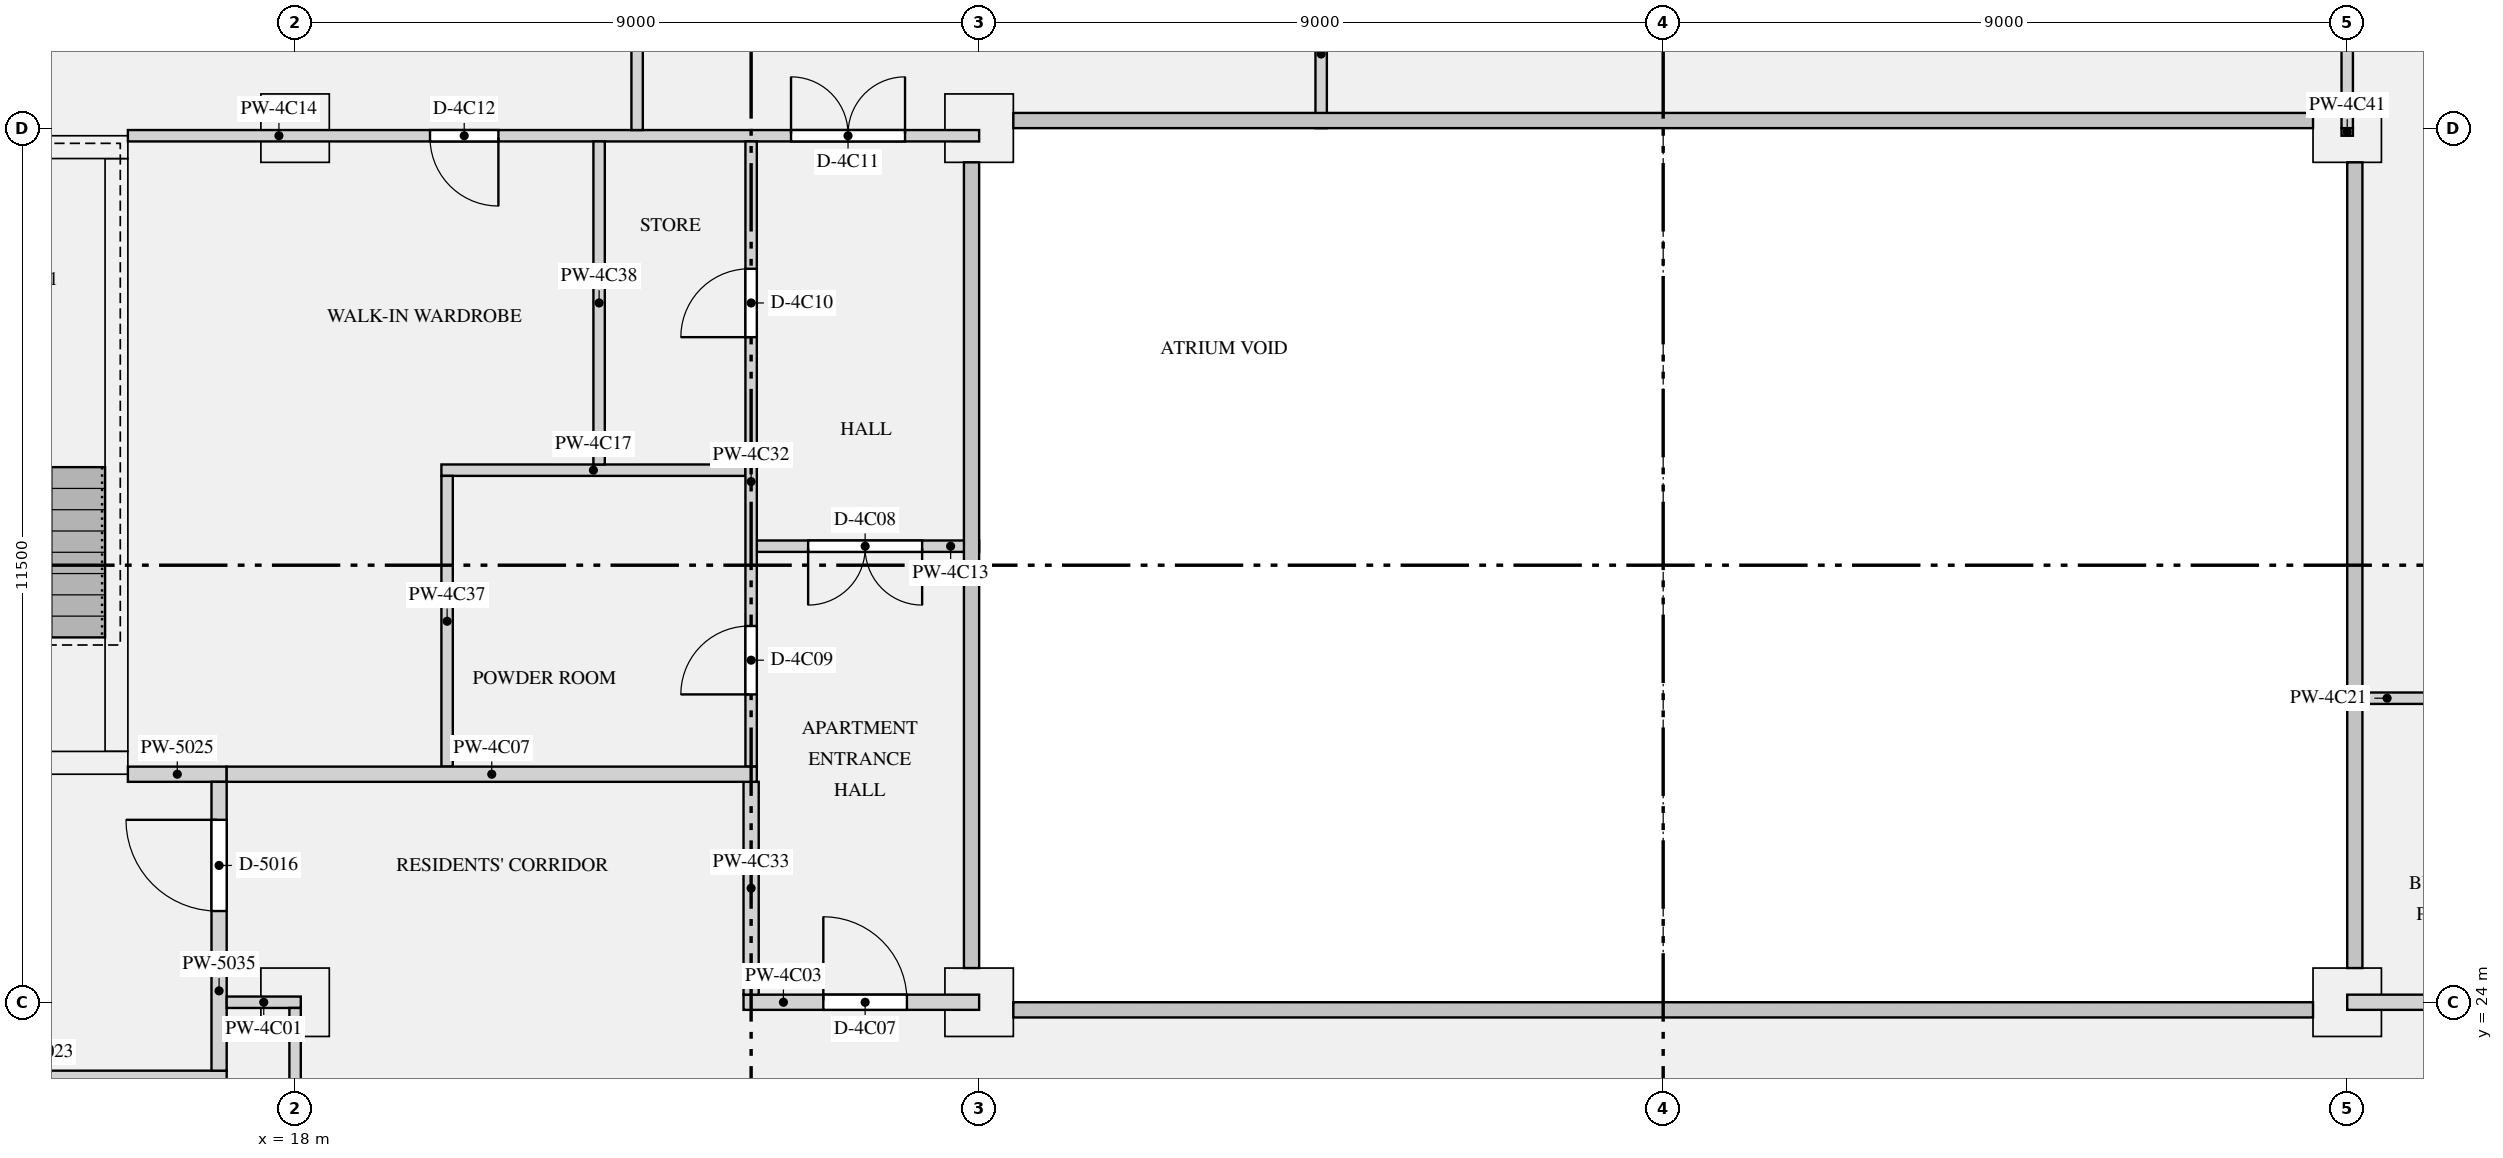
"""IFC4 building model, lengths in metres.
Left out: names, types, materials, properties, quantities, classifications, styles, units other than length and angle.
Written with IfcOpenShell. Run it as: python <this file> out.ifc"""

import sys

from ifc_helpers import new_model, si_unit, direction, frame, frame_2d, origin, origin_2d, place, context, subcontext, project, spatial, rectangle, extrude, element, fill, save


model = new_model("IFC4")
c1 = context("Model", 3, precision=1e-05, world=origin(), true_north=direction((0.0, 1.0)))
c2 = subcontext(c1, "Body", "Model", "MODEL_VIEW")
j1 = project(units=[si_unit("LENGTHUNIT", "METRE"), si_unit("PLANEANGLEUNIT", "RADIAN")], contexts=[c1])
p1 = place(None, origin())
s1 = spatial("IfcSite", under=j1, at=p1, CompositionType="ELEMENT")
p2 = place(p1, origin())
s2 = spatial("IfcBuilding", under=s1, at=p2, CompositionType="ELEMENT")
p3 = place(p2, frame((0.0, 0.0, 216.9)))
s3 = spatial("IfcBuildingStorey", under=s2, at=p3, CompositionType="ELEMENT", Elevation=216.9)
for number, where, z_axis, x_axis in (
    (1, (18.0, 24.0, 0.0), (0.0, 0.0, 1.0), (1.0, 0.0, 0.0)),
    (2, (27.0, 24.0, 0.0), (0.0, 0.0, 1.0), (1.0, 0.0, 0.0)),
    (3, (45.0, 24.0, 0.0), (0.0, 0.0, 1.0), (1.0, 0.0, 0.0)),
    (4, (18.0, 35.5, 0.0), (0.0, 0.0, 1.0), (1.0, 0.0, 0.0)),
    (5, (27.0, 35.5, 0.0), (0.0, 0.0, 1.0), (1.0, 0.0, 0.0)),
    (6, (45.0, 35.5, 0.0), (0.0, 0.0, 1.0), (1.0, 0.0, 0.0)),
):
    element("IfcColumn", number, at=place(p3, frame(where, z_axis=z_axis, x_axis=x_axis)), inside=s3, PredefinedType="COLUMN", context=c2, shape_type="SweptSolid", body=[
        extrude(rectangle(XDim=0.9, YDim=0.9, at=origin_2d()), origin(), (0.0, 0.0, 1.0), 3.15),
    ])
p4 = place(p3, frame((12.2, 27.15, 0.0), z_axis=(0.0, 0.0, 1.0), x_axis=(1.0, 0.0, 0.0)))
e7 = element("IfcWall", 7, at=p4, inside=s3, PredefinedType="SHEAR", context=c2, shape_type="SweptSolid", body=[
    extrude(rectangle(XDim=3.6, YDim=0.3, at=frame_2d((1.8, 0.0))), origin(), (0.0, 0.0, 1.0), 3.15),
])
p5 = place(p4, frame((1.25, 0.0, 0.0)))
e8 = element("IfcOpeningElement", 8, at=p5, cuts=e7, PredefinedType="OPENING", context=c2, shape_type="SweptSolid", body=[
    extrude(rectangle(XDim=1.1, YDim=2.1, at=frame_2d((0.55, 1.05))), frame((0.0, 0.16, 0.0), z_axis=(0.0, -1.0, 0.0), x_axis=(1.0, 0.0, 0.0)), (0.0, 0.0, 1.0), 0.32),
])
p6 = place(p3, frame((12.2, 35.25, 0.0), z_axis=(0.0, 0.0, 1.0), x_axis=(1.0, 0.0, 0.0)))
e9 = element("IfcWall", 9, at=p6, inside=s3, PredefinedType="SHEAR", context=c2, shape_type="SweptSolid", body=[
    extrude(rectangle(XDim=3.6, YDim=0.3, at=frame_2d((1.8, 0.0))), origin(), (0.0, 0.0, 1.0), 3.15),
])
p7 = place(p3, frame((15.65, 27.3, 0.0), z_axis=(0.0, 0.0, 1.0), x_axis=(0.0, 1.0, 0.0)))
e10 = element("IfcWall", 10, at=p7, inside=s3, PredefinedType="SHEAR", context=c2, shape_type="SweptSolid", body=[
    extrude(rectangle(XDim=7.8, YDim=0.3, at=frame_2d((3.9, 0.0))), origin(), (0.0, 0.0, 1.0), 3.15),
])
p8 = place(p3, frame((12.1, 23.0, 0.0), z_axis=(0.0, 0.0, 1.0), x_axis=(1.0, 0.0, 0.0)))
e11 = element("IfcWall", 11, at=p8, inside=s3, PredefinedType="PARTITIONING", context=c2, shape_type="SweptSolid", body=[
    extrude(rectangle(XDim=5.0, YDim=0.2, at=frame_2d((2.5, 0.0))), origin(), (0.0, 0.0, 1.0), 2.83),
])
p9 = place(p3, frame((15.8, 27.0, 0.0), z_axis=(0.0, 0.0, 1.0), x_axis=(1.0, 0.0, 0.0)))
e12 = element("IfcWall", 12, at=p9, inside=s3, PredefinedType="PARTITIONING", context=c2, shape_type="SweptSolid", body=[
    extrude(rectangle(XDim=1.3, YDim=0.2, at=frame_2d((0.65, 0.0))), origin(), (0.0, 0.0, 1.0), 2.83),
])
p10 = place(p3, frame((17.0, 23.1, 0.0), z_axis=(0.0, 0.0, 1.0), x_axis=(0.0, 1.0, 0.0)))
e13 = element("IfcWall", 13, at=p10, inside=s3, PredefinedType="PARTITIONING", context=c2, shape_type="SweptSolid", body=[
    extrude(rectangle(XDim=3.8, YDim=0.2, at=frame_2d((1.9, 0.0))), origin(), (0.0, 0.0, 1.0), 2.83),
])
p11 = place(p10, frame((2.1, 0.0, 0.0)))
e14 = element("IfcOpeningElement", 14, at=p11, cuts=e13, PredefinedType="OPENING", context=c2, shape_type="SweptSolid", body=[
    extrude(rectangle(XDim=1.2, YDim=2.1, at=frame_2d((0.6, 1.05))), frame((0.0, 0.11, 0.0), z_axis=(0.0, -1.0, 0.0), x_axis=(1.0, 0.0, 0.0)), (0.0, 0.0, 1.0), 0.22),
])
p12 = place(p3, frame((17.1, 24.0, 0.0), z_axis=(0.0, 0.0, 1.0), x_axis=(1.0, 0.0, 0.0)))
e15 = element("IfcWall", 15, at=p12, inside=s3, PredefinedType="PARTITIONING", context=c2, shape_type="SweptSolid", body=[
    extrude(rectangle(XDim=0.975, YDim=0.15, at=frame_2d((0.487, 0.0))), origin(), (0.0, 0.0, 1.0), 2.83),
])
p13 = place(p3, frame((23.9, 24.0, 0.0), z_axis=(0.0, 0.0, 1.0), x_axis=(1.0, 0.0, 0.0)))
e16 = element("IfcWall", 16, at=p13, inside=s3, PredefinedType="PARTITIONING", context=c2, shape_type="SweptSolid", body=[
    extrude(rectangle(XDim=3.1, YDim=0.2, at=frame_2d((1.55, 0.0))), origin(), (0.0, 0.0, 1.0), 2.83),
])
p14 = place(p13, frame((1.05, 0.0, 0.0)))
e17 = element("IfcOpeningElement", 17, at=p14, cuts=e16, PredefinedType="OPENING", context=c2, shape_type="SweptSolid", body=[
    extrude(rectangle(XDim=1.1, YDim=2.1, at=frame_2d((0.55, 1.05))), frame((0.0, 0.11, 0.0), z_axis=(0.0, -1.0, 0.0), x_axis=(1.0, 0.0, 0.0)), (0.0, 0.0, 1.0), 0.22),
])
p15 = place(p3, frame((45.0, 24.0, 0.0), z_axis=(0.0, 0.0, 1.0), x_axis=(1.0, 0.0, 0.0)))
e18 = element("IfcWall", 18, at=p15, inside=s3, PredefinedType="PARTITIONING", context=c2, shape_type="SweptSolid", body=[
    extrude(rectangle(XDim=3.1, YDim=0.2, at=frame_2d((1.55, 0.0))), origin(), (0.0, 0.0, 1.0), 2.83),
])
p16 = place(p3, frame((17.1, 27.0, 0.0), z_axis=(0.0, 0.0, 1.0), x_axis=(1.0, 0.0, 0.0)))
e19 = element("IfcWall", 19, at=p16, inside=s3, PredefinedType="PARTITIONING", context=c2, shape_type="SweptSolid", body=[
    extrude(rectangle(XDim=6.975, YDim=0.2, at=frame_2d((3.487, 0.0))), origin(), (0.0, 0.0, 1.0), 2.83),
])
p17 = place(p3, frame((24.075, 30.0, 0.0), z_axis=(0.0, 0.0, 1.0), x_axis=(1.0, 0.0, 0.0)))
e20 = element("IfcWall", 20, at=p17, inside=s3, PredefinedType="PARTITIONING", context=c2, shape_type="SweptSolid", body=[
    extrude(rectangle(XDim=2.925, YDim=0.15, at=frame_2d((1.462, 0.0))), origin(), (0.0, 0.0, 1.0), 2.83),
])
p18 = place(p17, frame((0.675, 0.0, 0.0)))
e21 = element("IfcOpeningElement", 21, at=p18, cuts=e20, PredefinedType="OPENING", context=c2, shape_type="SweptSolid", body=[
    extrude(rectangle(XDim=1.5, YDim=2.1, at=frame_2d((0.75, 1.05))), frame((0.0, 0.085, 0.0), z_axis=(0.0, -1.0, 0.0), x_axis=(1.0, 0.0, 0.0)), (0.0, 0.0, 1.0), 0.17),
])
p19 = place(p3, frame((15.8, 35.4, 0.0), z_axis=(0.0, 0.0, 1.0), x_axis=(1.0, 0.0, 0.0)))
e22 = element("IfcWall", 22, at=p19, inside=s3, PredefinedType="PARTITIONING", context=c2, shape_type="SweptSolid", body=[
    extrude(rectangle(XDim=11.2, YDim=0.15, at=frame_2d((5.6, 0.0))), origin(), (0.0, 0.0, 1.0), 2.83),
])
p20 = place(p19, frame((8.725, 0.0, 0.0)))
e23 = element("IfcOpeningElement", 23, at=p20, cuts=e22, PredefinedType="OPENING", context=c2, shape_type="SweptSolid", body=[
    extrude(rectangle(XDim=1.5, YDim=2.1, at=frame_2d((0.75, 1.05))), frame((0.0, 0.085, 0.0), z_axis=(0.0, -1.0, 0.0), x_axis=(1.0, 0.0, 0.0)), (0.0, 0.0, 1.0), 0.17),
])
p21 = place(p19, frame((3.975, 0.0, 0.0)))
e24 = element("IfcOpeningElement", 24, at=p21, cuts=e22, PredefinedType="OPENING", context=c2, shape_type="SweptSolid", body=[
    extrude(rectangle(XDim=0.9, YDim=2.1, at=frame_2d((0.45, 1.05))), frame((0.0, 0.085, 0.0), z_axis=(0.0, -1.0, 0.0), x_axis=(1.0, 0.0, 0.0)), (0.0, 0.0, 1.0), 0.17),
])
p22 = place(p3, frame((19.925, 31.0, 0.0), z_axis=(0.0, 0.0, 1.0), x_axis=(1.0, 0.0, 0.0)))
e25 = element("IfcWall", 25, at=p22, inside=s3, PredefinedType="PARTITIONING", context=c2, shape_type="SweptSolid", body=[
    extrude(rectangle(XDim=4.0, YDim=0.15, at=frame_2d((2.0, 0.0))), origin(), (0.0, 0.0, 1.0), 2.83),
])
p23 = place(p3, frame((45.0, 28.0, 0.0), z_axis=(0.0, 0.0, 1.0), x_axis=(1.0, 0.0, 0.0)))
e26 = element("IfcWall", 26, at=p23, inside=s3, PredefinedType="PARTITIONING", context=c2, shape_type="SweptSolid", body=[
    extrude(rectangle(XDim=2.925, YDim=0.15, at=frame_2d((1.462, 0.0))), origin(), (0.0, 0.0, 1.0), 2.83),
])
p24 = place(p23, frame((1.05, 0.0, 0.0)))
e27 = element("IfcOpeningElement", 27, at=p24, cuts=e26, PredefinedType="OPENING", context=c2, shape_type="SweptSolid", body=[
    extrude(rectangle(XDim=0.9, YDim=2.1, at=frame_2d((0.45, 1.05))), frame((0.0, 0.085, 0.0), z_axis=(0.0, -1.0, 0.0), x_axis=(1.0, 0.0, 0.0)), (0.0, 0.0, 1.0), 0.17),
])
p25 = place(p3, frame((18.0, 16.1, 0.0), z_axis=(0.0, 0.0, 1.0), x_axis=(0.0, 1.0, 0.0)))
e28 = element("IfcWall", 28, at=p25, inside=s3, PredefinedType="PARTITIONING", context=c2, shape_type="SweptSolid", body=[
    extrude(rectangle(XDim=7.825, YDim=0.15, at=frame_2d((3.913, 0.0))), origin(), (0.0, 0.0, 1.0), 2.83),
])
p26 = place(p25, frame((1.65, 0.0, 0.0)))
e29 = element("IfcOpeningElement", 29, at=p26, cuts=e28, PredefinedType="OPENING", context=c2, shape_type="SweptSolid", body=[
    extrude(rectangle(XDim=1.5, YDim=2.1, at=frame_2d((0.75, 1.05))), frame((0.0, 0.085, 0.0), z_axis=(0.0, -1.0, 0.0), x_axis=(1.0, 0.0, 0.0)), (0.0, 0.0, 1.0), 0.17),
])
p27 = place(p25, frame((5.25, 0.0, 0.0)))
e30 = element("IfcOpeningElement", 30, at=p27, cuts=e28, PredefinedType="OPENING", context=c2, shape_type="SweptSolid", body=[
    extrude(rectangle(XDim=0.9, YDim=2.1, at=frame_2d((0.45, 1.05))), frame((0.0, 0.085, 0.0), z_axis=(0.0, -1.0, 0.0), x_axis=(1.0, 0.0, 0.0)), (0.0, 0.0, 1.0), 0.17),
])
p28 = place(p3, frame((24.0, 27.1, 0.0), z_axis=(0.0, 0.0, 1.0), x_axis=(0.0, 1.0, 0.0)))
e31 = element("IfcWall", 31, at=p28, inside=s3, PredefinedType="PARTITIONING", context=c2, shape_type="SweptSolid", body=[
    extrude(rectangle(XDim=8.225, YDim=0.15, at=frame_2d((4.112, 0.0))), origin(), (0.0, 0.0, 1.0), 2.83),
])
p29 = place(p28, frame((0.95, 0.0, 0.0)))
e32 = element("IfcOpeningElement", 32, at=p29, cuts=e31, PredefinedType="OPENING", context=c2, shape_type="SweptSolid", body=[
    extrude(rectangle(XDim=0.9, YDim=2.1, at=frame_2d((0.45, 1.05))), frame((0.0, 0.085, 0.0), z_axis=(0.0, -1.0, 0.0), x_axis=(1.0, 0.0, 0.0)), (0.0, 0.0, 1.0), 0.17),
])
p30 = place(p28, frame((5.65, 0.0, 0.0)))
e33 = element("IfcOpeningElement", 33, at=p30, cuts=e31, PredefinedType="OPENING", context=c2, shape_type="SweptSolid", body=[
    extrude(rectangle(XDim=0.9, YDim=2.1, at=frame_2d((0.45, 1.05))), frame((0.0, 0.085, 0.0), z_axis=(0.0, -1.0, 0.0), x_axis=(1.0, 0.0, 0.0)), (0.0, 0.0, 1.0), 0.17),
])
p31 = place(p3, frame((24.0, 24.1, 0.0), z_axis=(0.0, 0.0, 1.0), x_axis=(0.0, 1.0, 0.0)))
e34 = element("IfcWall", 34, at=p31, inside=s3, PredefinedType="PARTITIONING", context=c2, shape_type="SweptSolid", body=[
    extrude(rectangle(XDim=2.8, YDim=0.2, at=frame_2d((1.4, 0.0))), origin(), (0.0, 0.0, 1.0), 2.83),
])
p32 = place(p3, frame((20.0, 27.1, 0.0), z_axis=(0.0, 0.0, 1.0), x_axis=(0.0, 1.0, 0.0)))
e35 = element("IfcWall", 35, at=p32, inside=s3, PredefinedType="PARTITIONING", context=c2, shape_type="SweptSolid", body=[
    extrude(rectangle(XDim=3.825, YDim=0.15, at=frame_2d((1.913, 0.0))), origin(), (0.0, 0.0, 1.0), 2.83),
])
p33 = place(p3, frame((22.0, 31.075, 0.0), z_axis=(0.0, 0.0, 1.0), x_axis=(0.0, 1.0, 0.0)))
e36 = element("IfcWall", 36, at=p33, inside=s3, PredefinedType="PARTITIONING", context=c2, shape_type="SweptSolid", body=[
    extrude(rectangle(XDim=4.25, YDim=0.15, at=frame_2d((2.125, 0.0))), origin(), (0.0, 0.0, 1.0), 2.83),
])
p34 = place(p3, frame((22.5, 35.475, 0.0), z_axis=(0.0, 0.0, 1.0), x_axis=(0.0, 1.0, 0.0)))
e37 = element("IfcWall", 37, at=p34, inside=s3, PredefinedType="PARTITIONING", context=c2, shape_type="SweptSolid", body=[
    extrude(rectangle(XDim=5.375, YDim=0.15, at=frame_2d((2.688, 0.0))), origin(), (0.0, 0.0, 1.0), 2.83),
])
p35 = place(p34, frame((2.275, 0.0, 0.0)))
e38 = element("IfcOpeningElement", 38, at=p35, cuts=e37, PredefinedType="OPENING", context=c2, shape_type="SweptSolid", body=[
    extrude(rectangle(XDim=0.9, YDim=2.1, at=frame_2d((0.45, 1.05))), frame((0.0, 0.085, 0.0), z_axis=(0.0, -1.0, 0.0), x_axis=(1.0, 0.0, 0.0)), (0.0, 0.0, 1.0), 0.17),
])
p36 = place(p3, frame((31.5, 35.5, 0.0), z_axis=(0.0, 0.0, 1.0), x_axis=(0.0, 1.0, 0.0)))
e39 = element("IfcWall", 39, at=p36, inside=s3, PredefinedType="PARTITIONING", context=c2, shape_type="SweptSolid", body=[
    extrude(rectangle(XDim=5.35, YDim=0.15, at=frame_2d((2.675, 0.0))), origin(), (0.0, 0.0, 1.0), 2.83),
])
p37 = place(p36, frame((1.95, 0.0, 0.0)))
e40 = element("IfcOpeningElement", 40, at=p37, cuts=e39, PredefinedType="OPENING", context=c2, shape_type="SweptSolid", body=[
    extrude(rectangle(XDim=1.5, YDim=2.1, at=frame_2d((0.75, 1.05))), frame((0.0, 0.085, 0.0), z_axis=(0.0, -1.0, 0.0), x_axis=(1.0, 0.0, 0.0)), (0.0, 0.0, 1.0), 0.17),
])
p38 = place(p3, frame((45.0, 35.4, 0.0), z_axis=(0.0, 0.0, 1.0), x_axis=(0.0, 1.0, 0.0)))
e41 = element("IfcWall", 41, at=p38, inside=s3, PredefinedType="PARTITIONING", context=c2, shape_type="SweptSolid", body=[
    extrude(rectangle(XDim=0.1, YDim=0.15, at=frame_2d((0.05, 0.0))), origin(), (0.0, 0.0, 1.0), 2.83),
])
p39 = place(p3, frame((45.0, 35.5, 0.0), z_axis=(0.0, 0.0, 1.0), x_axis=(0.0, 1.0, 0.0)))
e42 = element("IfcWall", 42, at=p39, inside=s3, PredefinedType="PARTITIONING", context=c2, shape_type="SweptSolid", body=[
    extrude(rectangle(XDim=5.35, YDim=0.15, at=frame_2d((2.675, 0.0))), origin(), (0.0, 0.0, 1.0), 2.83),
])
p40 = place(p39, frame((2.225, 0.0, 0.0)))
e43 = element("IfcOpeningElement", 43, at=p40, cuts=e42, PredefinedType="OPENING", context=c2, shape_type="SweptSolid", body=[
    extrude(rectangle(XDim=1.5, YDim=2.1, at=frame_2d((0.75, 1.05))), frame((0.0, 0.085, 0.0), z_axis=(0.0, -1.0, 0.0), x_axis=(1.0, 0.0, 0.0)), (0.0, 0.0, 1.0), 0.17),
])
p41 = place(p11, origin())
e44 = element("IfcDoor", 44, at=p41, inside=s3, OperationType="SINGLE_SWING_RIGHT", PredefinedType="DOOR", context=c2, shape_type="SweptSolid", body=[
    extrude(rectangle(XDim=1.2, YDim=2.1, at=frame_2d((0.6, 1.05))), frame((0.0, 0.025, 0.0), z_axis=(0.0, -1.0, 0.0), x_axis=(1.0, 0.0, 0.0)), (0.0, 0.0, 1.0), 0.05),
])
fill(e14, e44)
p42 = place(p14, origin())
e45 = element("IfcDoor", 45, at=p42, inside=s3, OperationType="SINGLE_SWING_LEFT", PredefinedType="DOOR", context=c2, shape_type="SweptSolid", body=[
    extrude(rectangle(XDim=1.1, YDim=2.1, at=frame_2d((0.55, 1.05))), frame((0.0, 0.025, 0.0), z_axis=(0.0, -1.0, 0.0), x_axis=(1.0, 0.0, 0.0)), (0.0, 0.0, 1.0), 0.05),
])
fill(e17, e45)
p43 = place(p18, frame((1.5, 0.0, 0.0), z_axis=(0.0, 0.0, 1.0), x_axis=(-1.0, 0.0, 0.0)))
e46 = element("IfcDoor", 46, at=p43, inside=s3, OperationType="DOUBLE_DOOR_SINGLE_SWING", PredefinedType="DOOR", context=c2, shape_type="SweptSolid", body=[
    extrude(rectangle(XDim=1.5, YDim=2.1, at=frame_2d((0.75, 1.05))), frame((0.0, 0.025, 0.0), z_axis=(0.0, -1.0, 0.0), x_axis=(1.0, 0.0, 0.0)), (0.0, 0.0, 1.0), 0.05),
])
fill(e21, e46)
p44 = place(p29, origin())
e47 = element("IfcDoor", 47, at=p44, inside=s3, OperationType="SINGLE_SWING_LEFT", PredefinedType="DOOR", context=c2, shape_type="SweptSolid", body=[
    extrude(rectangle(XDim=0.9, YDim=2.1, at=frame_2d((0.45, 1.05))), frame((0.0, 0.025, 0.0), z_axis=(0.0, -1.0, 0.0), x_axis=(1.0, 0.0, 0.0)), (0.0, 0.0, 1.0), 0.05),
])
fill(e32, e47)
p45 = place(p30, origin())
e48 = element("IfcDoor", 48, at=p45, inside=s3, OperationType="SINGLE_SWING_LEFT", PredefinedType="DOOR", context=c2, shape_type="SweptSolid", body=[
    extrude(rectangle(XDim=0.9, YDim=2.1, at=frame_2d((0.45, 1.05))), frame((0.0, 0.025, 0.0), z_axis=(0.0, -1.0, 0.0), x_axis=(1.0, 0.0, 0.0)), (0.0, 0.0, 1.0), 0.05),
])
fill(e33, e48)
p46 = place(p20, origin())
e49 = element("IfcDoor", 49, at=p46, inside=s3, OperationType="DOUBLE_DOOR_SINGLE_SWING", PredefinedType="DOOR", context=c2, shape_type="SweptSolid", body=[
    extrude(rectangle(XDim=1.5, YDim=2.1, at=frame_2d((0.75, 1.05))), frame((0.0, 0.025, 0.0), z_axis=(0.0, -1.0, 0.0), x_axis=(1.0, 0.0, 0.0)), (0.0, 0.0, 1.0), 0.05),
])
fill(e23, e49)
p47 = place(p21, frame((0.9, 0.0, 0.0), z_axis=(0.0, 0.0, 1.0), x_axis=(-1.0, 0.0, 0.0)))
e50 = element("IfcDoor", 50, at=p47, inside=s3, OperationType="SINGLE_SWING_LEFT", PredefinedType="DOOR", context=c2, shape_type="SweptSolid", body=[
    extrude(rectangle(XDim=0.9, YDim=2.1, at=frame_2d((0.45, 1.05))), frame((0.0, 0.025, 0.0), z_axis=(0.0, -1.0, 0.0), x_axis=(1.0, 0.0, 0.0)), (0.0, 0.0, 1.0), 0.05),
])
fill(e24, e50)
save(model, sys.argv[1])
